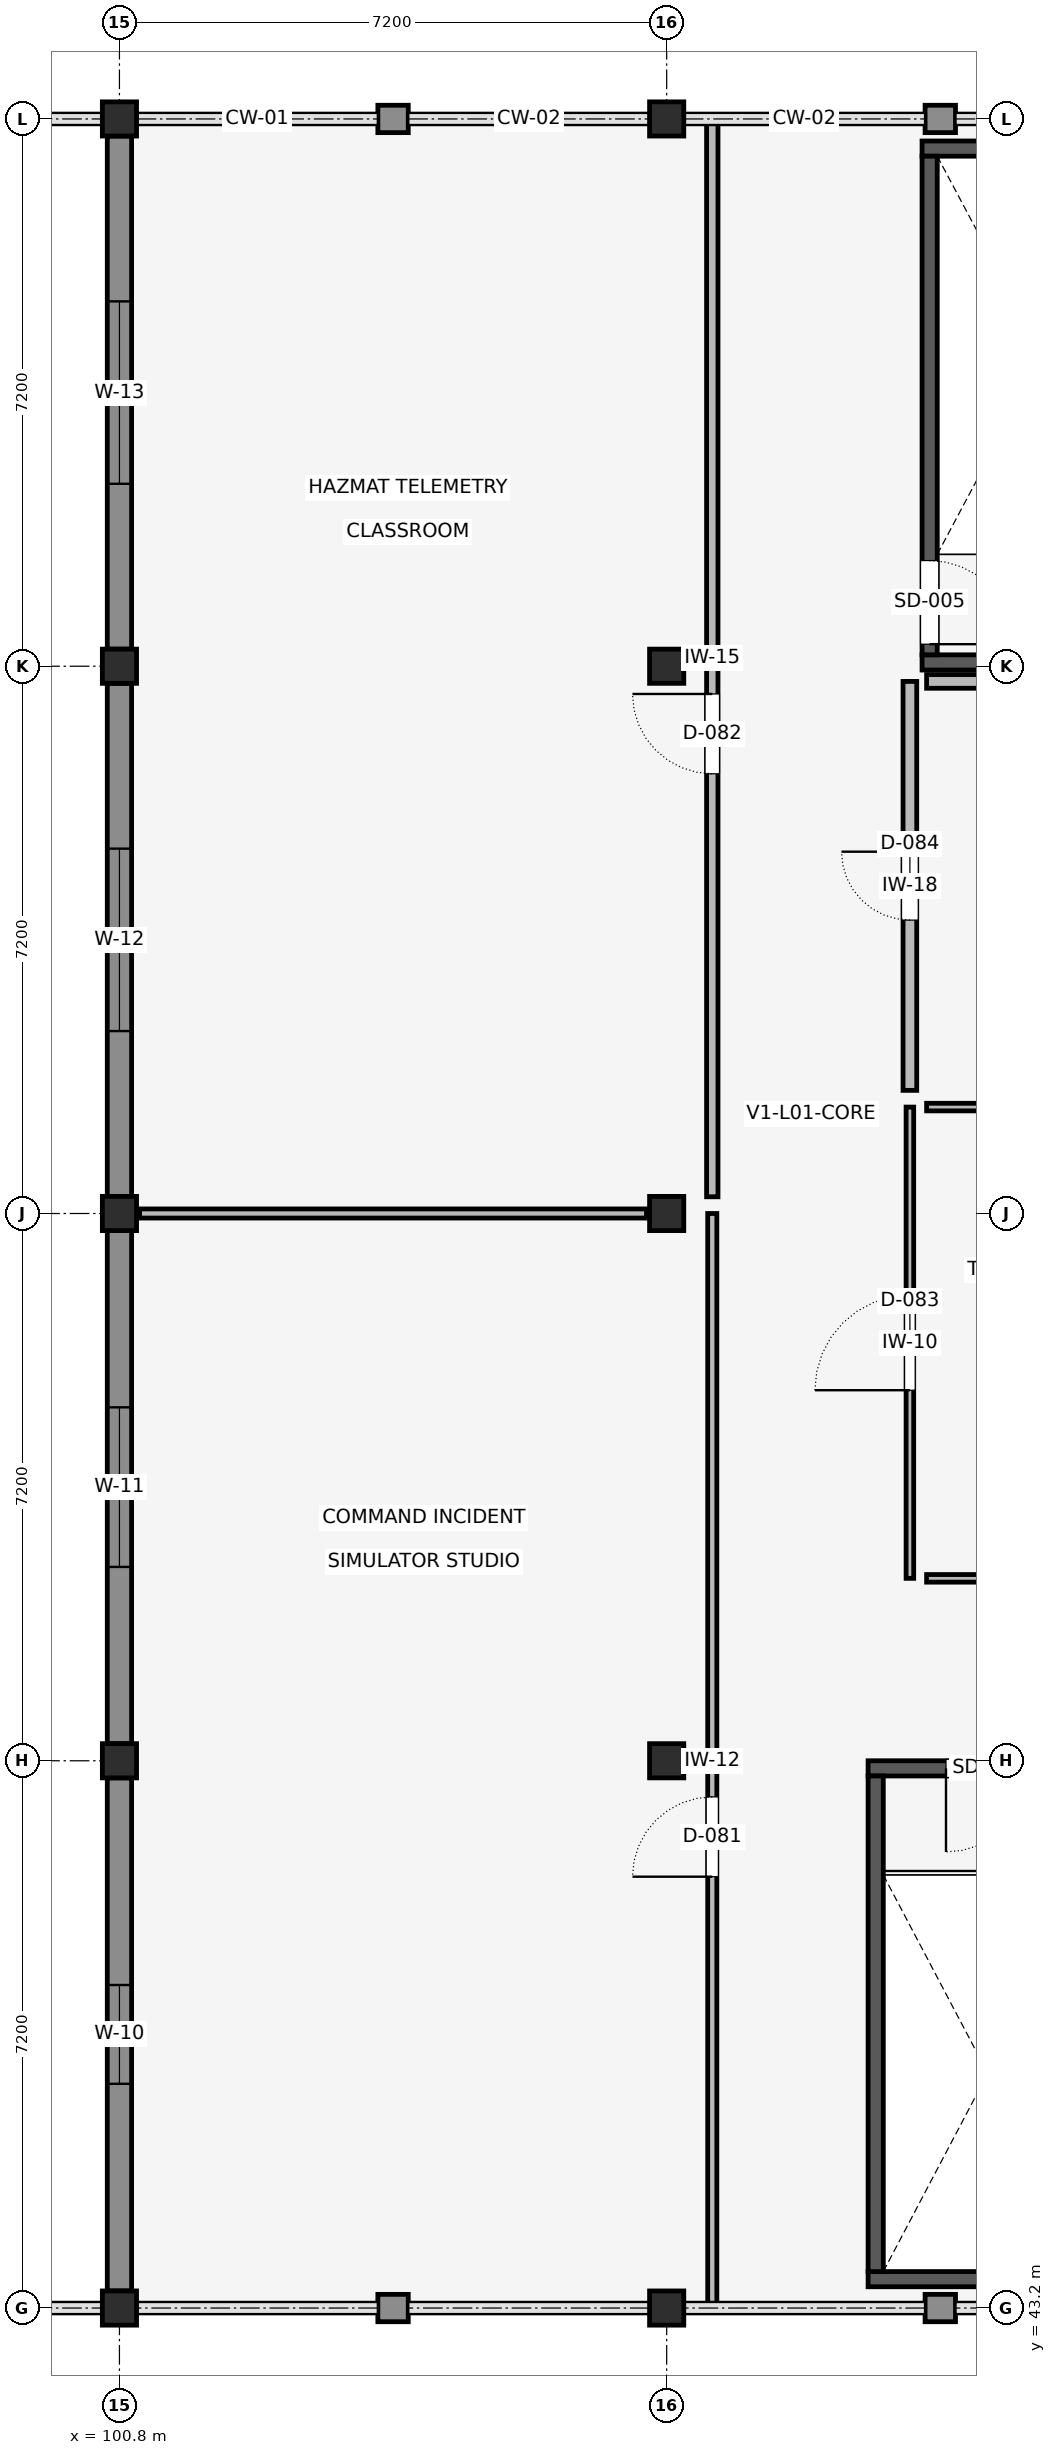
"""IFC4 building model, lengths in metres.
Left out: names, types, materials, properties, quantities, classifications, styles, units other than length and angle.
Written with IfcOpenShell. Run it as: python <this file> out.ifc"""

import sys

from ifc_helpers import new_model, si_unit, direction, frame, frame_2d, origin, origin_2d, place, context, subcontext, project, spatial, rectangle, extrude, element, fill, save


model = new_model("IFC4")
c1 = context("Model", 3, precision=1e-05, world=origin(), true_north=direction((0.0, 1.0)))
c2 = subcontext(c1, "Body", "Model", "MODEL_VIEW")
j1 = project(units=[si_unit("LENGTHUNIT", "METRE"), si_unit("PLANEANGLEUNIT", "RADIAN")], contexts=[c1])
p1 = place(None, origin())
s1 = spatial("IfcSite", under=j1, at=p1, CompositionType="ELEMENT")
p2 = place(p1, origin())
s2 = spatial("IfcBuilding", under=s1, at=p2, CompositionType="ELEMENT")
p3 = place(p2, frame((0.0, 0.0, 5.4)))
s3 = spatial("IfcBuildingStorey", under=s2, at=p3, CompositionType="ELEMENT", Elevation=5.4)
for number, where, z_axis, x_axis in (
    (1, (100.8, 43.2, 0.0), (0.0, 0.0, 1.0), (1.0, 0.0, 0.0)),
    (2, (100.8, 50.4, 0.0), (0.0, 0.0, 1.0), (1.0, 0.0, 0.0)),
    (3, (100.8, 57.6, 0.0), (0.0, 0.0, 1.0), (1.0, 0.0, 0.0)),
    (4, (100.8, 64.8, 0.0), (0.0, 0.0, 1.0), (1.0, 0.0, 0.0)),
    (5, (100.8, 72.0, 0.0), (0.0, 0.0, 1.0), (1.0, 0.0, 0.0)),
    (6, (108.0, 43.2, 0.0), (0.0, 0.0, 1.0), (1.0, 0.0, 0.0)),
    (7, (108.0, 50.4, 0.0), (0.0, 0.0, 1.0), (1.0, 0.0, 0.0)),
    (8, (108.0, 57.6, 0.0), (0.0, 0.0, 1.0), (1.0, 0.0, 0.0)),
    (9, (108.0, 64.8, 0.0), (0.0, 0.0, 1.0), (1.0, 0.0, 0.0)),
    (10, (108.0, 72.0, 0.0), (0.0, 0.0, 1.0), (1.0, 0.0, 0.0)),
):
    element("IfcColumn", number, at=place(p3, frame(where, z_axis=z_axis, x_axis=x_axis)), inside=s3, PredefinedType="COLUMN", context=c2, shape_type="SweptSolid", body=[
        extrude(rectangle(XDim=0.45, YDim=0.45, at=origin_2d()), origin(), (0.0, 0.0, 1.0), 4.2),
    ])
p4 = place(p3, frame((111.36, 64.85, 0.0), z_axis=(0.0, 0.0, 1.0), x_axis=(1.0, 0.0, 0.0)))
e11 = element("IfcWall", 11, at=p4, inside=s3, PredefinedType="SHEAR", context=c2, shape_type="SweptSolid", body=[
    extrude(rectangle(XDim=3.615, YDim=0.2, at=frame_2d((1.808, 0.0))), origin(), (0.0, 0.0, 1.0), 3.95),
])
p5 = place(p3, frame((111.36, 71.61, 0.0), z_axis=(0.0, 0.0, 1.0), x_axis=(1.0, 0.0, 0.0)))
e12 = element("IfcWall", 12, at=p5, inside=s3, PredefinedType="SHEAR", context=c2, shape_type="SweptSolid", body=[
    extrude(rectangle(XDim=3.19, YDim=0.2, at=frame_2d((1.595, 0.0))), origin(), (0.0, 0.0, 1.0), 3.95),
])
p6 = place(p3, frame((111.46, 64.95, 0.0), z_axis=(0.0, 0.0, 1.0), x_axis=(0.0, 1.0, 0.0)))
e13 = element("IfcWall", 13, at=p6, inside=s3, PredefinedType="SHEAR", context=c2, shape_type="SweptSolid", body=[
    extrude(rectangle(XDim=6.56, YDim=0.2, at=frame_2d((3.28, 0.0))), origin(), (0.0, 0.0, 1.0), 3.95),
])
p7 = place(p6, frame((0.14, 0.0, 0.0)))
e14 = element("IfcOpeningElement", 14, at=p7, cuts=e13, PredefinedType="OPENING", context=c2, shape_type="SweptSolid", body=[
    extrude(rectangle(XDim=1.1, YDim=2.15, at=frame_2d((0.55, 1.075))), frame((0.0, 0.112, 0.0), z_axis=(0.0, -1.0, 0.0), x_axis=(1.0, 0.0, 0.0)), (0.0, 0.0, 1.0), 0.224),
])
p8 = place(p3, frame((110.65, 43.58, 0.0), z_axis=(0.0, 0.0, 1.0), x_axis=(1.0, 0.0, 0.0)))
e15 = element("IfcWall", 15, at=p8, inside=s3, PredefinedType="SHEAR", context=c2, shape_type="SweptSolid", body=[
    extrude(rectangle(XDim=3.15, YDim=0.2, at=frame_2d((1.575, 0.0))), origin(), (0.0, 0.0, 1.0), 3.95),
])
p9 = place(p3, frame((110.65, 50.3, 0.0), z_axis=(0.0, 0.0, 1.0), x_axis=(1.0, 0.0, 0.0)))
e16 = element("IfcWall", 16, at=p9, inside=s3, PredefinedType="SHEAR", context=c2, shape_type="SweptSolid", body=[
    extrude(rectangle(XDim=3.15, YDim=0.2, at=frame_2d((1.575, 0.0))), origin(), (0.0, 0.0, 1.0), 3.95),
])
p10 = place(p9, frame((1.025, 0.0, 0.0)))
e17 = element("IfcOpeningElement", 17, at=p10, cuts=e16, PredefinedType="OPENING", context=c2, shape_type="SweptSolid", body=[
    extrude(rectangle(XDim=1.1, YDim=2.15, at=frame_2d((0.55, 1.075))), frame((0.0, 0.112, 0.0), z_axis=(0.0, -1.0, 0.0), x_axis=(1.0, 0.0, 0.0)), (0.0, 0.0, 1.0), 0.224),
])
p11 = place(p3, frame((110.75, 43.68, 0.0), z_axis=(0.0, 0.0, 1.0), x_axis=(0.0, 1.0, 0.0)))
e18 = element("IfcWall", 18, at=p11, inside=s3, PredefinedType="SHEAR", context=c2, shape_type="SweptSolid", body=[
    extrude(rectangle(XDim=6.52, YDim=0.2, at=frame_2d((3.26, 0.0))), origin(), (0.0, 0.0, 1.0), 3.95),
])
p12 = place(p3, frame((100.8, 43.425, 0.0), z_axis=(0.0, 0.0, 1.0), x_axis=(0.0, 1.0, 0.0)))
e19 = element("IfcWall", 19, at=p12, inside=s3, PredefinedType="ELEMENTEDWALL", context=c2, shape_type="SweptSolid", body=[
    extrude(rectangle(XDim=6.75, YDim=0.32, at=frame_2d((3.375, 0.0))), origin(), (0.0, 0.0, 1.0), 3.773),
])
p13 = place(p12, frame((2.725, 0.0, 0.85)))
e20 = element("IfcOpeningElement", 20, at=p13, cuts=e19, PredefinedType="OPENING", context=c2, shape_type="SweptSolid", body=[
    extrude(rectangle(XDim=1.3, YDim=1.85, at=frame_2d((0.65, 0.925))), frame((0.0, 0.172, 0.0), z_axis=(0.0, -1.0, 0.0), x_axis=(1.0, 0.0, 0.0)), (0.0, 0.0, 1.0), 0.344),
])
p14 = place(p3, frame((100.8, 50.625, 0.0), z_axis=(0.0, 0.0, 1.0), x_axis=(0.0, 1.0, 0.0)))
e21 = element("IfcWall", 21, at=p14, inside=s3, PredefinedType="ELEMENTEDWALL", context=c2, shape_type="SweptSolid", body=[
    extrude(rectangle(XDim=6.75, YDim=0.32, at=frame_2d((3.375, 0.0))), origin(), (0.0, 0.0, 1.0), 3.773),
])
p15 = place(p14, frame((2.325, 0.0, 0.85)))
e22 = element("IfcOpeningElement", 22, at=p15, cuts=e21, PredefinedType="OPENING", context=c2, shape_type="SweptSolid", body=[
    extrude(rectangle(XDim=2.1, YDim=2.15, at=frame_2d((1.05, 1.075))), frame((0.0, 0.172, 0.0), z_axis=(0.0, -1.0, 0.0), x_axis=(1.0, 0.0, 0.0)), (0.0, 0.0, 1.0), 0.344),
])
p16 = place(p3, frame((100.8, 57.825, 0.0), z_axis=(0.0, 0.0, 1.0), x_axis=(0.0, 1.0, 0.0)))
e23 = element("IfcWall", 23, at=p16, inside=s3, PredefinedType="ELEMENTEDWALL", context=c2, shape_type="SweptSolid", body=[
    extrude(rectangle(XDim=6.75, YDim=0.32, at=frame_2d((3.375, 0.0))), origin(), (0.0, 0.0, 1.0), 3.773),
])
p17 = place(p16, frame((2.175, 0.0, 0.85)))
e24 = element("IfcOpeningElement", 24, at=p17, cuts=e23, PredefinedType="OPENING", context=c2, shape_type="SweptSolid", body=[
    extrude(rectangle(XDim=2.4, YDim=2.05, at=frame_2d((1.2, 1.025))), frame((0.0, 0.172, 0.0), z_axis=(0.0, -1.0, 0.0), x_axis=(1.0, 0.0, 0.0)), (0.0, 0.0, 1.0), 0.344),
])
p18 = place(p3, frame((100.8, 65.025, 0.0), z_axis=(0.0, 0.0, 1.0), x_axis=(0.0, 1.0, 0.0)))
e25 = element("IfcWall", 25, at=p18, inside=s3, PredefinedType="ELEMENTEDWALL", context=c2, shape_type="SweptSolid", body=[
    extrude(rectangle(XDim=6.75, YDim=0.32, at=frame_2d((3.375, 0.0))), origin(), (0.0, 0.0, 1.0), 3.773),
])
p19 = place(p18, frame((2.175, 0.0, 1.6)))
e26 = element("IfcOpeningElement", 26, at=p19, cuts=e25, PredefinedType="OPENING", context=c2, shape_type="SweptSolid", body=[
    extrude(rectangle(XDim=2.4, YDim=1.05, at=frame_2d((1.2, 0.525))), frame((0.0, 0.172, 0.0), z_axis=(0.0, -1.0, 0.0), x_axis=(1.0, 0.0, 0.0)), (0.0, 0.0, 1.0), 0.344),
])
for number, where, z_axis, x_axis in (
    (27, (104.2, 72.0, 0.0), (0.0, 0.0, 1.0), (1.0, 0.0, 0.0)),
    (28, (111.4, 72.0, 0.0), (0.0, 0.0, 1.0), (1.0, 0.0, 0.0)),
    (29, (111.8, 43.2, 0.0), (0.0, 0.0, 1.0), (-1.0, 0.0, 0.0)),
    (30, (104.6, 43.2, 0.0), (0.0, 0.0, 1.0), (-1.0, 0.0, 0.0)),
):
    element("IfcWall", number, at=place(p3, frame(where, z_axis=z_axis, x_axis=x_axis)), inside=s3, PredefinedType="SOLIDWALL", context=c2, shape_type="SweptSolid", body=[
        extrude(rectangle(XDim=0.4, YDim=0.36, at=frame_2d((0.2, 0.0))), origin(), (0.0, 0.0, 1.0), 3.721),
    ])
p20 = place(p3, frame((108.6, 43.2, 0.0), z_axis=(0.0, 0.0, 1.0), x_axis=(0.0, 1.0, 0.0)))
e31 = element("IfcWall", 31, at=p20, inside=s3, PredefinedType="PARTITIONING", context=c2, shape_type="SweptSolid", body=[
    extrude(rectangle(XDim=14.4, YDim=0.12, at=frame_2d((7.2, 0.0))), origin(), (0.0, 0.0, 1.0), 3.719),
])
p21 = place(p20, frame((5.675, 0.0, 0.0)))
e32 = element("IfcOpeningElement", 32, at=p21, cuts=e31, PredefinedType="OPENING", context=c2, shape_type="SweptSolid", body=[
    extrude(rectangle(XDim=1.05, YDim=2.15, at=frame_2d((0.525, 1.075))), frame((0.0, 0.072, 0.0), z_axis=(0.0, -1.0, 0.0), x_axis=(1.0, 0.0, 0.0)), (0.0, 0.0, 1.0), 0.144),
])
p22 = place(p3, frame((101.065, 57.6, 0.0), z_axis=(0.0, 0.0, 1.0), x_axis=(1.0, 0.0, 0.0)))
e33 = element("IfcWall", 33, at=p22, inside=s3, PredefinedType="PARTITIONING", context=c2, shape_type="SweptSolid", body=[
    extrude(rectangle(XDim=6.67, YDim=0.12, at=frame_2d((3.335, 0.0))), origin(), (0.0, 0.0, 1.0), 3.773),
])
p23 = place(p3, frame((108.6, 57.82, 0.0), z_axis=(0.0, 0.0, 1.0), x_axis=(0.0, 1.0, 0.0)))
e34 = element("IfcWall", 34, at=p23, inside=s3, PredefinedType="STANDARD", context=c2, shape_type="SweptSolid", body=[
    extrude(rectangle(XDim=14.18, YDim=0.15, at=frame_2d((7.09, 0.0))), origin(), (0.0, 0.0, 1.0), 3.719),
])
p24 = place(p23, frame((5.565, 0.0, 0.0)))
e35 = element("IfcOpeningElement", 35, at=p24, cuts=e34, PredefinedType="OPENING", context=c2, shape_type="SweptSolid", body=[
    extrude(rectangle(XDim=1.05, YDim=2.15, at=frame_2d((0.525, 1.075))), frame((0.0, 0.087, 0.0), z_axis=(0.0, -1.0, 0.0), x_axis=(1.0, 0.0, 0.0)), (0.0, 0.0, 1.0), 0.174),
])
p25 = place(p3, frame((111.2, 52.8, 0.0), z_axis=(0.0, 0.0, 1.0), x_axis=(0.0, 1.0, 0.0)))
e36 = element("IfcWall", 36, at=p25, inside=s3, PredefinedType="PARTITIONING", context=c2, shape_type="SweptSolid", body=[
    extrude(rectangle(XDim=6.2, YDim=0.1, at=frame_2d((3.1, 0.0))), origin(), (0.0, 0.0, 1.0), 3.773),
])
p26 = place(p25, frame((2.475, 0.0, 0.0)))
e37 = element("IfcOpeningElement", 37, at=p26, cuts=e36, PredefinedType="OPENING", context=c2, shape_type="SweptSolid", body=[
    extrude(rectangle(XDim=1.25, YDim=2.15, at=frame_2d((0.625, 1.075))), frame((0.0, 0.062, 0.0), z_axis=(0.0, -1.0, 0.0), x_axis=(1.0, 0.0, 0.0)), (0.0, 0.0, 1.0), 0.124),
])
for number, where, z_axis, x_axis in (
    (38, (111.42, 52.8, 0.0), (0.0, 0.0, 1.0), (1.0, 0.0, 0.0)),
    (39, (111.42, 59.0, 0.0), (0.0, 0.0, 1.0), (1.0, 0.0, 0.0)),
):
    element("IfcWall", number, at=place(p3, frame(where, z_axis=z_axis, x_axis=x_axis)), inside=s3, PredefinedType="PARTITIONING", context=c2, shape_type="SweptSolid", body=[
        extrude(rectangle(XDim=3.56, YDim=0.1, at=frame_2d((1.78, 0.0))), origin(), (0.0, 0.0, 1.0), 3.92),
    ])
p27 = place(p3, frame((111.2, 59.22, 0.0), z_axis=(0.0, 0.0, 1.0), x_axis=(0.0, 1.0, 0.0)))
e40 = element("IfcWall", 40, at=p27, inside=s3, PredefinedType="PLUMBINGWALL", context=c2, shape_type="SweptSolid", body=[
    extrude(rectangle(XDim=5.38, YDim=0.18, at=frame_2d((2.69, 0.0))), origin(), (0.0, 0.0, 1.0), 3.92),
])
p28 = place(p27, frame((2.24, 0.0, 0.0)))
e41 = element("IfcOpeningElement", 41, at=p28, cuts=e40, PredefinedType="OPENING", context=c2, shape_type="SweptSolid", body=[
    extrude(rectangle(XDim=0.9, YDim=2.1, at=frame_2d((0.45, 1.05))), frame((0.0, 0.102, 0.0), z_axis=(0.0, -1.0, 0.0), x_axis=(1.0, 0.0, 0.0)), (0.0, 0.0, 1.0), 0.204),
])
p29 = place(p3, frame((111.42, 64.6, 0.0), z_axis=(0.0, 0.0, 1.0), x_axis=(1.0, 0.0, 0.0)))
e42 = element("IfcWall", 42, at=p29, inside=s3, PredefinedType="PLUMBINGWALL", context=c2, shape_type="SweptSolid", body=[
    extrude(rectangle(XDim=3.515, YDim=0.18, at=frame_2d((1.758, 0.0))), origin(), (0.0, 0.0, 1.0), 3.92),
])
p30 = place(p13, origin())
e43 = element("IfcWindow", 43, at=p30, inside=s3, PartitioningType="SINGLE_PANEL", PredefinedType="WINDOW", context=c2, shape_type="SweptSolid", body=[
    extrude(rectangle(XDim=1.3, YDim=1.85, at=frame_2d((0.65, 0.925))), frame((0.0, 0.03, 0.0), z_axis=(0.0, -1.0, 0.0), x_axis=(1.0, 0.0, 0.0)), (0.0, 0.0, 1.0), 0.06),
])
fill(e20, e43)
p31 = place(p15, origin())
e44 = element("IfcWindow", 44, at=p31, inside=s3, PartitioningType="SINGLE_PANEL", PredefinedType="WINDOW", context=c2, shape_type="SweptSolid", body=[
    extrude(rectangle(XDim=2.1, YDim=2.15, at=frame_2d((1.05, 1.075))), frame((0.0, 0.03, 0.0), z_axis=(0.0, -1.0, 0.0), x_axis=(1.0, 0.0, 0.0)), (0.0, 0.0, 1.0), 0.06),
])
fill(e22, e44)
p32 = place(p17, origin())
e45 = element("IfcWindow", 45, at=p32, inside=s3, PartitioningType="SINGLE_PANEL", PredefinedType="WINDOW", context=c2, shape_type="SweptSolid", body=[
    extrude(rectangle(XDim=2.4, YDim=2.05, at=frame_2d((1.2, 1.025))), frame((0.0, 0.03, 0.0), z_axis=(0.0, -1.0, 0.0), x_axis=(1.0, 0.0, 0.0)), (0.0, 0.0, 1.0), 0.06),
])
fill(e24, e45)
p33 = place(p19, origin())
e46 = element("IfcWindow", 46, at=p33, inside=s3, PartitioningType="SINGLE_PANEL", PredefinedType="WINDOW", context=c2, shape_type="SweptSolid", body=[
    extrude(rectangle(XDim=2.4, YDim=1.05, at=frame_2d((1.2, 0.525))), frame((0.0, 0.03, 0.0), z_axis=(0.0, -1.0, 0.0), x_axis=(1.0, 0.0, 0.0)), (0.0, 0.0, 1.0), 0.06),
])
fill(e26, e46)
p34 = place(p7, frame((1.1, 0.0, 0.0), z_axis=(0.0, 0.0, 1.0), x_axis=(-1.0, 0.0, 0.0)))
e47 = element("IfcDoor", 47, at=p34, inside=s3, OperationType="SINGLE_SWING_RIGHT", PredefinedType="DOOR", context=c2, shape_type="SweptSolid", body=[
    extrude(rectangle(XDim=1.1, YDim=2.15, at=frame_2d((0.55, 1.075))), frame((0.0, 0.025, 0.0), z_axis=(0.0, -1.0, 0.0), x_axis=(1.0, 0.0, 0.0)), (0.0, 0.0, 1.0), 0.05),
])
fill(e14, e47)
p35 = place(p10, frame((1.1, 0.0, 0.0), z_axis=(0.0, 0.0, 1.0), x_axis=(-1.0, 0.0, 0.0)))
e48 = element("IfcDoor", 48, at=p35, inside=s3, OperationType="SINGLE_SWING_RIGHT", PredefinedType="DOOR", context=c2, shape_type="SweptSolid", body=[
    extrude(rectangle(XDim=1.1, YDim=2.15, at=frame_2d((0.55, 1.075))), frame((0.0, 0.025, 0.0), z_axis=(0.0, -1.0, 0.0), x_axis=(1.0, 0.0, 0.0)), (0.0, 0.0, 1.0), 0.05),
])
fill(e17, e48)
p36 = place(p21, origin())
e49 = element("IfcDoor", 49, at=p36, inside=s3, OperationType="SINGLE_SWING_LEFT", PredefinedType="DOOR", context=c2, shape_type="SweptSolid", body=[
    extrude(rectangle(XDim=1.05, YDim=2.15, at=frame_2d((0.525, 1.075))), frame((0.0, 0.025, 0.0), z_axis=(0.0, -1.0, 0.0), x_axis=(1.0, 0.0, 0.0)), (0.0, 0.0, 1.0), 0.05),
])
fill(e32, e49)
p37 = place(p24, origin())
e50 = element("IfcDoor", 50, at=p37, inside=s3, OperationType="SINGLE_SWING_RIGHT", PredefinedType="DOOR", context=c2, shape_type="SweptSolid", body=[
    extrude(rectangle(XDim=1.05, YDim=2.15, at=frame_2d((0.525, 1.075))), frame((0.0, 0.025, 0.0), z_axis=(0.0, -1.0, 0.0), x_axis=(1.0, 0.0, 0.0)), (0.0, 0.0, 1.0), 0.05),
])
fill(e35, e50)
p38 = place(p26, origin())
e51 = element("IfcDoor", 51, at=p38, inside=s3, OperationType="SINGLE_SWING_LEFT", PredefinedType="DOOR", context=c2, shape_type="SweptSolid", body=[
    extrude(rectangle(XDim=1.25, YDim=2.15, at=frame_2d((0.625, 1.075))), frame((0.0, 0.025, 0.0), z_axis=(0.0, -1.0, 0.0), x_axis=(1.0, 0.0, 0.0)), (0.0, 0.0, 1.0), 0.05),
])
fill(e37, e51)
p39 = place(p28, origin())
e52 = element("IfcDoor", 52, at=p39, inside=s3, OperationType="SINGLE_SWING_RIGHT", PredefinedType="DOOR", context=c2, shape_type="SweptSolid", body=[
    extrude(rectangle(XDim=0.9, YDim=2.1, at=frame_2d((0.45, 1.05))), frame((0.0, 0.025, 0.0), z_axis=(0.0, -1.0, 0.0), x_axis=(1.0, 0.0, 0.0)), (0.0, 0.0, 1.0), 0.05),
])
fill(e41, e52)
save(model, sys.argv[1])
